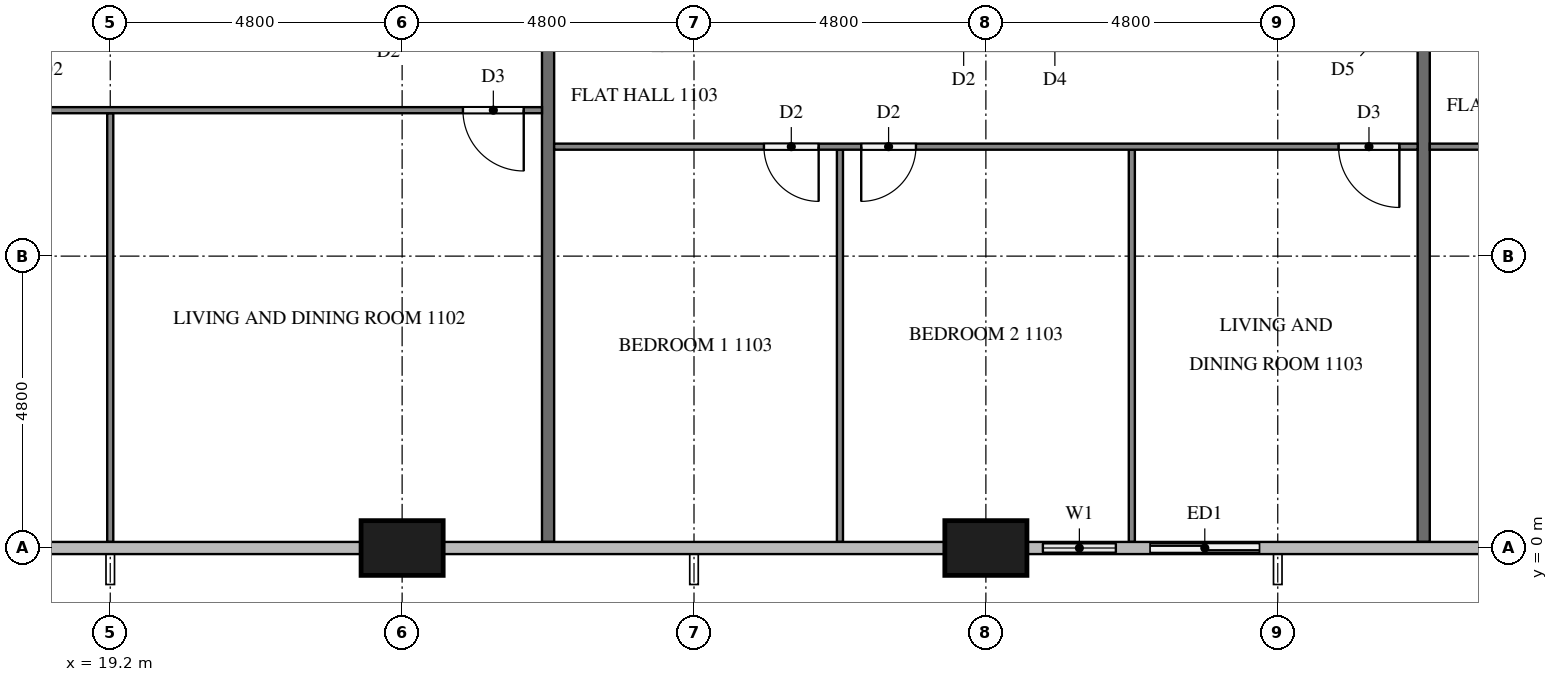
"""IFC4 building model, lengths in metres.
Left out: names, types, materials, properties, quantities, classifications, styles, units other than length and angle.
Written with IfcOpenShell. Run it as: python <this file> out.ifc"""

import sys

from ifc_helpers import new_model, si_unit, direction, frame, frame_2d, origin, origin_2d, place, context, subcontext, project, spatial, rectangle, extrude, element, fill, save


model = new_model("IFC4")
c1 = context("Model", 3, precision=1e-05, world=origin(), true_north=direction((0.0, 1.0)))
c2 = subcontext(c1, "Body", "Model", "MODEL_VIEW")
j1 = project(units=[si_unit("LENGTHUNIT", "METRE"), si_unit("PLANEANGLEUNIT", "RADIAN")], contexts=[c1])
p1 = place(None, origin())
s1 = spatial("IfcSite", under=j1, at=p1, CompositionType="ELEMENT")
p2 = place(p1, origin())
s2 = spatial("IfcBuilding", under=s1, at=p2, CompositionType="ELEMENT")
p3 = place(p2, frame((0.0, 0.0, 46.9)))
s3 = spatial("IfcBuildingStorey", under=s2, at=p3, CompositionType="ELEMENT", Elevation=46.9)
for number, where, z_axis, x_axis in (
    (1, (24.0, 0.0, 0.0), (0.0, 0.0, 1.0), (1.0, 0.0, 0.0)),
    (2, (33.6, 0.0, 0.0), (0.0, 0.0, 1.0), (1.0, 0.0, 0.0)),
):
    element("IfcColumn", number, at=place(p3, frame(where, z_axis=z_axis, x_axis=x_axis)), inside=s3, PredefinedType="COLUMN", context=c2, shape_type="SweptSolid", body=[
        extrude(rectangle(XDim=1.35, YDim=0.9, at=origin_2d()), origin(), (0.0, 0.0, 1.0), 3.2),
    ])
p4 = place(p3, frame((34.275, 0.0, 0.0), z_axis=(0.0, 0.0, 1.0), x_axis=(1.0, 0.0, 0.0)))
e3 = element("IfcWall", 3, at=p4, inside=s3, PredefinedType="SOLIDWALL", context=c2, shape_type="SweptSolid", body=[
    extrude(rectangle(XDim=4.125, YDim=0.15, at=frame_2d((2.062, 0.0))), origin(), (0.0, 0.0, 1.0), 3.2),
])
p5 = place(p4, frame((0.262, 0.0, 0.9)))
e4 = element("IfcOpeningElement", 4, at=p5, cuts=e3, PredefinedType="OPENING", context=c2, shape_type="SweptSolid", body=[
    extrude(rectangle(XDim=1.2, YDim=1.4, at=frame_2d((0.6, 0.7))), frame((0.0, 0.085, 0.0), z_axis=(0.0, -1.0, 0.0), x_axis=(1.0, 0.0, 0.0)), (0.0, 0.0, 1.0), 0.17),
])
p6 = place(p4, frame((2.025, 0.0, 0.0)))
e5 = element("IfcOpeningElement", 5, at=p6, cuts=e3, PredefinedType="OPENING", context=c2, shape_type="SweptSolid", body=[
    extrude(rectangle(XDim=1.8, YDim=2.4, at=frame_2d((0.9, 1.2))), frame((0.0, 0.085, 0.0), z_axis=(0.0, -1.0, 0.0), x_axis=(1.0, 0.0, 0.0)), (0.0, 0.0, 1.0), 0.17),
])
for number, where, z_axis, x_axis in (
    (6, (26.4, 11.9, 0.0), (0.0, 0.0, 1.0), (0.0, -1.0, 0.0)),
    (7, (40.8, 11.9, 0.0), (0.0, 0.0, 1.0), (0.0, -1.0, 0.0)),
):
    element("IfcWall", number, at=place(p3, frame(where, z_axis=z_axis, x_axis=x_axis)), inside=s3, PredefinedType="PARTITIONING", context=c2, shape_type="SweptSolid", body=[
        extrude(rectangle(XDim=11.8, YDim=0.2, at=frame_2d((5.9, 0.0))), origin(), (0.0, 0.0, 1.0), 3.2),
    ])
p7 = place(p3, frame((19.2, 7.15, 0.0), z_axis=(0.0, 0.0, 1.0), x_axis=(0.0, -1.0, 0.0)))
e8 = element("IfcWall", 8, at=p7, inside=s3, PredefinedType="PARTITIONING", context=c2, shape_type="SweptSolid", body=[
    extrude(rectangle(XDim=7.05, YDim=0.1, at=frame_2d((3.525, 0.0))), origin(), (0.0, 0.0, 1.0), 3.2),
])
p8 = place(p3, frame((26.3, 7.2, 0.0), z_axis=(0.0, 0.0, 1.0), x_axis=(-1.0, 0.0, 0.0)))
e9 = element("IfcWall", 9, at=p8, inside=s3, PredefinedType="PARTITIONING", context=c2, shape_type="SweptSolid", body=[
    extrude(rectangle(XDim=11.8, YDim=0.1, at=frame_2d((5.9, 0.0))), origin(), (0.0, 0.0, 1.0), 3.2),
])
p9 = place(p8, frame((0.3, 0.0, 0.0)))
e10 = element("IfcOpeningElement", 10, at=p9, cuts=e9, PredefinedType="OPENING", context=c2, shape_type="SweptSolid", body=[
    extrude(rectangle(XDim=1.0, YDim=2.1, at=frame_2d((0.5, 1.05))), frame((0.0, 0.06, 0.0), z_axis=(0.0, -1.0, 0.0), x_axis=(1.0, 0.0, 0.0)), (0.0, 0.0, 1.0), 0.12),
])
p10 = place(p8, frame((10.6, 0.0, 0.0)))
e11 = element("IfcOpeningElement", 11, at=p10, cuts=e9, PredefinedType="OPENING", context=c2, shape_type="SweptSolid", body=[
    extrude(rectangle(XDim=0.9, YDim=2.1, at=frame_2d((0.45, 1.05))), frame((0.0, 0.06, 0.0), z_axis=(0.0, -1.0, 0.0), x_axis=(1.0, 0.0, 0.0)), (0.0, 0.0, 1.0), 0.12),
])
for number, where, z_axis, x_axis in (
    (12, (31.2, 6.55, 0.0), (0.0, 0.0, 1.0), (0.0, -1.0, 0.0)),
    (13, (36.0, 6.55, 0.0), (0.0, 0.0, 1.0), (0.0, -1.0, 0.0)),
):
    element("IfcWall", number, at=place(p3, frame(where, z_axis=z_axis, x_axis=x_axis)), inside=s3, PredefinedType="PARTITIONING", context=c2, shape_type="SweptSolid", body=[
        extrude(rectangle(XDim=6.45, YDim=0.1, at=frame_2d((3.225, 0.0))), origin(), (0.0, 0.0, 1.0), 3.2),
    ])
p11 = place(p3, frame((40.7, 6.6, 0.0), z_axis=(0.0, 0.0, 1.0), x_axis=(-1.0, 0.0, 0.0)))
e14 = element("IfcWall", 14, at=p11, inside=s3, PredefinedType="PARTITIONING", context=c2, shape_type="SweptSolid", body=[
    extrude(rectangle(XDim=14.2, YDim=0.1, at=frame_2d((7.1, 0.0))), origin(), (0.0, 0.0, 1.0), 3.2),
])
p12 = place(p11, frame((9.85, 0.0, 0.0)))
e15 = element("IfcOpeningElement", 15, at=p12, cuts=e14, PredefinedType="OPENING", context=c2, shape_type="SweptSolid", body=[
    extrude(rectangle(XDim=0.9, YDim=2.1, at=frame_2d((0.45, 1.05))), frame((0.0, 0.06, 0.0), z_axis=(0.0, -1.0, 0.0), x_axis=(1.0, 0.0, 0.0)), (0.0, 0.0, 1.0), 0.12),
])
p13 = place(p11, frame((8.25, 0.0, 0.0)))
e16 = element("IfcOpeningElement", 16, at=p13, cuts=e14, PredefinedType="OPENING", context=c2, shape_type="SweptSolid", body=[
    extrude(rectangle(XDim=0.9, YDim=2.1, at=frame_2d((0.45, 1.05))), frame((0.0, 0.06, 0.0), z_axis=(0.0, -1.0, 0.0), x_axis=(1.0, 0.0, 0.0)), (0.0, 0.0, 1.0), 0.12),
])
p14 = place(p11, frame((0.3, 0.0, 0.0)))
e17 = element("IfcOpeningElement", 17, at=p14, cuts=e14, PredefinedType="OPENING", context=c2, shape_type="SweptSolid", body=[
    extrude(rectangle(XDim=1.0, YDim=2.1, at=frame_2d((0.5, 1.05))), frame((0.0, 0.06, 0.0), z_axis=(0.0, -1.0, 0.0), x_axis=(1.0, 0.0, 0.0)), (0.0, 0.0, 1.0), 0.12),
])
p15 = place(p3, frame((57.5, 6.6, 0.0), z_axis=(0.0, 0.0, 1.0), x_axis=(-1.0, 0.0, 0.0)))
e18 = element("IfcWall", 18, at=p15, inside=s3, PredefinedType="PARTITIONING", context=c2, shape_type="SweptSolid", body=[
    extrude(rectangle(XDim=16.6, YDim=0.1, at=frame_2d((8.3, 0.0))), origin(), (0.0, 0.0, 1.0), 3.2),
])
p16 = place(p15, frame((9.85, 0.0, 0.0)))
e19 = element("IfcOpeningElement", 19, at=p16, cuts=e18, PredefinedType="OPENING", context=c2, shape_type="SweptSolid", body=[
    extrude(rectangle(XDim=1.0, YDim=2.1, at=frame_2d((0.5, 1.05))), frame((0.0, 0.06, 0.0), z_axis=(0.0, -1.0, 0.0), x_axis=(1.0, 0.0, 0.0)), (0.0, 0.0, 1.0), 0.12),
])
p17 = place(p15, frame((8.25, 0.0, 0.0)))
e20 = element("IfcOpeningElement", 20, at=p17, cuts=e18, PredefinedType="OPENING", context=c2, shape_type="SweptSolid", body=[
    extrude(rectangle(XDim=0.9, YDim=2.1, at=frame_2d((0.45, 1.05))), frame((0.0, 0.06, 0.0), z_axis=(0.0, -1.0, 0.0), x_axis=(1.0, 0.0, 0.0)), (0.0, 0.0, 1.0), 0.12),
])
p18 = place(p15, frame((0.6, 0.0, 0.0)))
e21 = element("IfcOpeningElement", 21, at=p18, cuts=e18, PredefinedType="OPENING", context=c2, shape_type="SweptSolid", body=[
    extrude(rectangle(XDim=0.9, YDim=2.1, at=frame_2d((0.45, 1.05))), frame((0.0, 0.06, 0.0), z_axis=(0.0, -1.0, 0.0), x_axis=(1.0, 0.0, 0.0)), (0.0, 0.0, 1.0), 0.12),
])
p19 = place(p5, origin())
e22 = element("IfcWindow", 22, at=p19, inside=s3, PartitioningType="SINGLE_PANEL", PredefinedType="WINDOW", context=c2, shape_type="SweptSolid", body=[
    extrude(rectangle(XDim=1.2, YDim=1.4, at=frame_2d((0.6, 0.7))), frame((0.0, 0.03, 0.0), z_axis=(0.0, -1.0, 0.0), x_axis=(1.0, 0.0, 0.0)), (0.0, 0.0, 1.0), 0.06),
])
fill(e4, e22)
p20 = place(p6, origin())
e23 = element("IfcDoor", 23, at=p20, inside=s3, OperationType="SLIDING_TO_RIGHT", PredefinedType="DOOR", context=c2, shape_type="SweptSolid", body=[
    extrude(rectangle(XDim=1.8, YDim=2.4, at=frame_2d((0.9, 1.2))), frame((0.0, 0.025, 0.0), z_axis=(0.0, -1.0, 0.0), x_axis=(1.0, 0.0, 0.0)), (0.0, 0.0, 1.0), 0.05),
])
fill(e5, e23)
p21 = place(p9, origin())
e24 = element("IfcDoor", 24, at=p21, inside=s3, OperationType="SINGLE_SWING_LEFT", PredefinedType="DOOR", context=c2, shape_type="SweptSolid", body=[
    extrude(rectangle(XDim=1.0, YDim=2.1, at=frame_2d((0.5, 1.05))), frame((0.0, 0.025, 0.0), z_axis=(0.0, -1.0, 0.0), x_axis=(1.0, 0.0, 0.0)), (0.0, 0.0, 1.0), 0.05),
])
fill(e10, e24)
p22 = place(p12, origin())
e25 = element("IfcDoor", 25, at=p22, inside=s3, OperationType="SINGLE_SWING_LEFT", PredefinedType="DOOR", context=c2, shape_type="SweptSolid", body=[
    extrude(rectangle(XDim=0.9, YDim=2.1, at=frame_2d((0.45, 1.05))), frame((0.0, 0.025, 0.0), z_axis=(0.0, -1.0, 0.0), x_axis=(1.0, 0.0, 0.0)), (0.0, 0.0, 1.0), 0.05),
])
fill(e15, e25)
p23 = place(p13, origin())
e26 = element("IfcDoor", 26, at=p23, inside=s3, OperationType="SINGLE_SWING_RIGHT", PredefinedType="DOOR", context=c2, shape_type="SweptSolid", body=[
    extrude(rectangle(XDim=0.9, YDim=2.1, at=frame_2d((0.45, 1.05))), frame((0.0, 0.025, 0.0), z_axis=(0.0, -1.0, 0.0), x_axis=(1.0, 0.0, 0.0)), (0.0, 0.0, 1.0), 0.05),
])
fill(e16, e26)
p24 = place(p14, origin())
e27 = element("IfcDoor", 27, at=p24, inside=s3, OperationType="SINGLE_SWING_LEFT", PredefinedType="DOOR", context=c2, shape_type="SweptSolid", body=[
    extrude(rectangle(XDim=1.0, YDim=2.1, at=frame_2d((0.5, 1.05))), frame((0.0, 0.025, 0.0), z_axis=(0.0, -1.0, 0.0), x_axis=(1.0, 0.0, 0.0)), (0.0, 0.0, 1.0), 0.05),
])
fill(e17, e27)
save(model, sys.argv[1])
